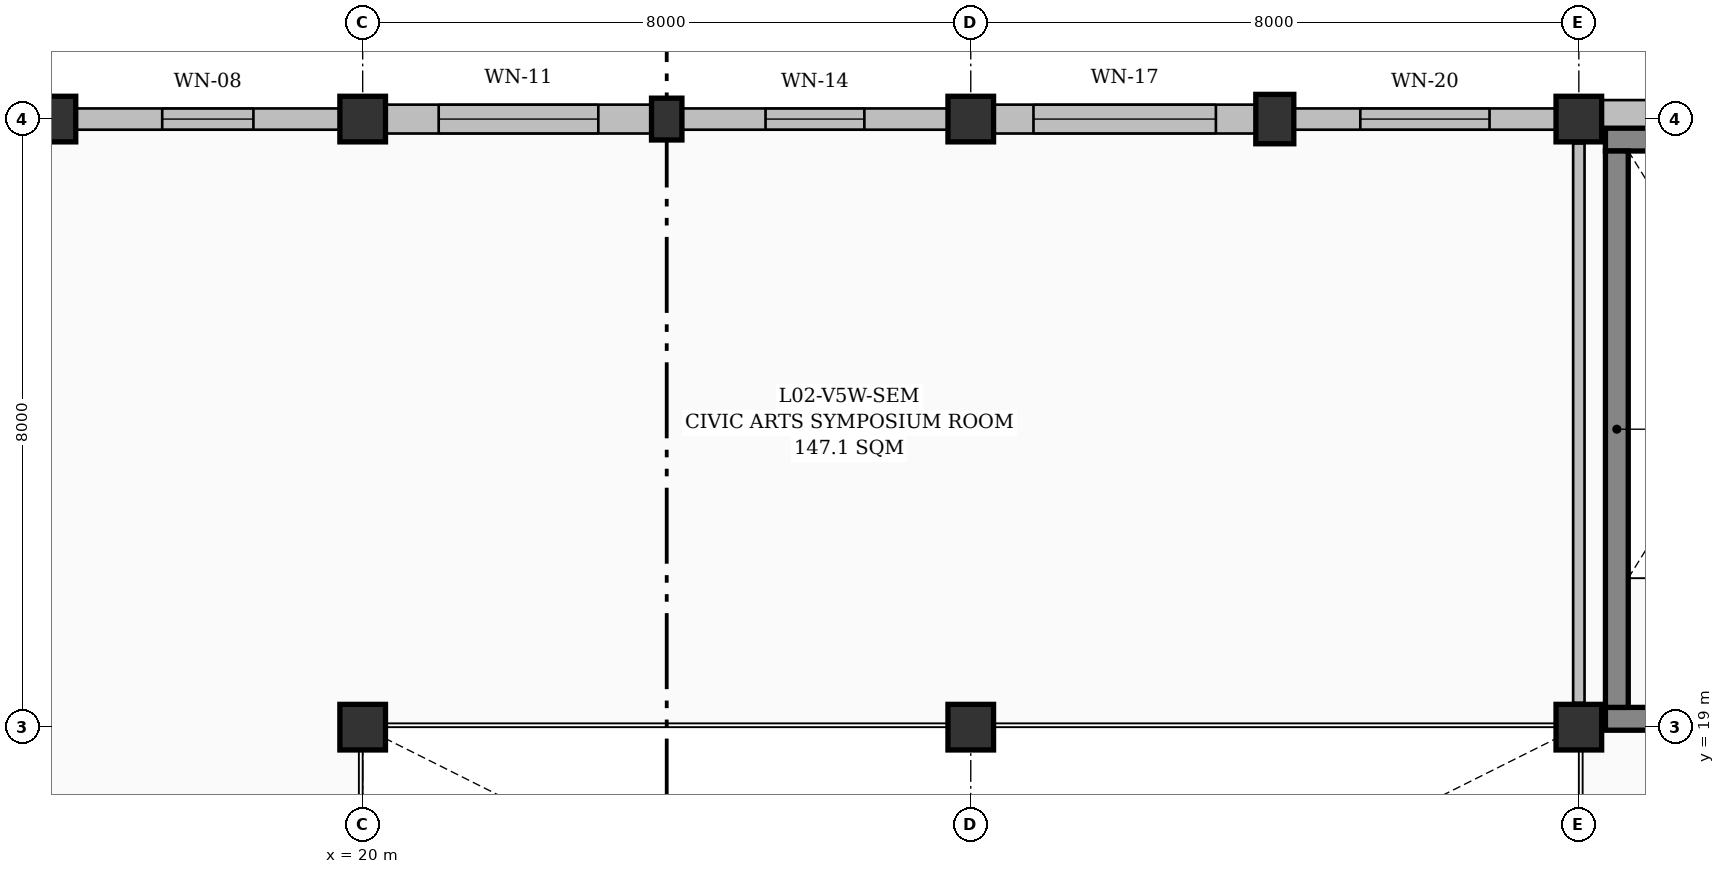
"""IFC4 building model, lengths in metres.
Left out: names, types, materials, properties, quantities, classifications, styles, units other than length and angle.
Written with IfcOpenShell. Run it as: python <this file> out.ifc"""

import sys

from ifc_helpers import new_model, si_unit, direction, frame, frame_2d, origin, origin_2d, place, context, subcontext, project, spatial, rectangle, extrude, element, fill, save


model = new_model("IFC4")
c1 = context("Model", 3, precision=1e-05, world=origin(), true_north=direction((0.0, 1.0)))
c2 = subcontext(c1, "Body", "Model", "MODEL_VIEW")
j1 = project(units=[si_unit("LENGTHUNIT", "METRE"), si_unit("PLANEANGLEUNIT", "RADIAN")], contexts=[c1])
p1 = place(None, origin())
s1 = spatial("IfcSite", under=j1, at=p1, CompositionType="ELEMENT")
p2 = place(p1, origin())
s2 = spatial("IfcBuilding", under=s1, at=p2, CompositionType="ELEMENT")
p3 = place(p2, frame((0.0, 0.0, 9.3)))
s3 = spatial("IfcBuildingStorey", under=s2, at=p3, CompositionType="ELEMENT", Elevation=9.3)
p4 = place(p3, frame((16.0, 27.0, 0.0), z_axis=(0.0, 0.0, 1.0), x_axis=(1.0, 0.0, 0.0)))
e1 = element("IfcColumn", 1, at=p4, inside=s3, PredefinedType="PILASTER", context=c2, shape_type="SweptSolid", body=[
    extrude(rectangle(XDim=0.45, YDim=0.6, at=origin_2d()), origin(), (0.0, 0.0, 1.0), 4.5),
])
for number, where, z_axis, x_axis in (
    (2, (20.0, 19.0, 0.0), (0.0, 0.0, 1.0), (1.0, 0.0, 0.0)),
    (3, (20.0, 27.0, 0.0), (0.0, 0.0, 1.0), (1.0, 0.0, 0.0)),
):
    element("IfcColumn", number, at=place(p3, frame(where, z_axis=z_axis, x_axis=x_axis)), inside=s3, PredefinedType="COLUMN", context=c2, shape_type="SweptSolid", body=[
        extrude(rectangle(XDim=0.6, YDim=0.6, at=origin_2d()), origin(), (0.0, 0.0, 1.0), 4.5),
    ])
p5 = place(p3, frame((24.0, 27.0, 0.0), z_axis=(0.0, 0.0, 1.0), x_axis=(1.0, 0.0, 0.0)))
e4 = element("IfcColumn", 4, at=p5, inside=s3, PredefinedType="PILASTER", context=c2, shape_type="SweptSolid", body=[
    extrude(rectangle(XDim=0.4, YDim=0.55, at=origin_2d()), origin(), (0.0, 0.0, 1.0), 4.5),
])
for number, where, z_axis, x_axis in (
    (5, (28.0, 19.0, 0.0), (0.0, 0.0, 1.0), (1.0, 0.0, 0.0)),
    (6, (28.0, 27.0, 0.0), (0.0, 0.0, 1.0), (1.0, 0.0, 0.0)),
):
    element("IfcColumn", number, at=place(p3, frame(where, z_axis=z_axis, x_axis=x_axis)), inside=s3, PredefinedType="COLUMN", context=c2, shape_type="SweptSolid", body=[
        extrude(rectangle(XDim=0.6, YDim=0.6, at=origin_2d()), origin(), (0.0, 0.0, 1.0), 4.5),
    ])
p6 = place(p3, frame((32.0, 27.0, 0.0), z_axis=(0.0, 0.0, 1.0), x_axis=(1.0, 0.0, 0.0)))
e7 = element("IfcColumn", 7, at=p6, inside=s3, PredefinedType="PILASTER", context=c2, shape_type="SweptSolid", body=[
    extrude(rectangle(XDim=0.5, YDim=0.65, at=origin_2d()), origin(), (0.0, 0.0, 1.0), 4.5),
])
for number, where, z_axis, x_axis in (
    (8, (36.0, 19.0, 0.0), (0.0, 0.0, 1.0), (1.0, 0.0, 0.0)),
    (9, (36.0, 27.0, 0.0), (0.0, 0.0, 1.0), (1.0, 0.0, 0.0)),
):
    element("IfcColumn", number, at=place(p3, frame(where, z_axis=z_axis, x_axis=x_axis)), inside=s3, PredefinedType="COLUMN", context=c2, shape_type="SweptSolid", body=[
        extrude(rectangle(XDim=0.6, YDim=0.6, at=origin_2d()), origin(), (0.0, 0.0, 1.0), 4.5),
    ])
p7 = place(p3, frame((16.225, 27.0, 0.0), z_axis=(0.0, 0.0, 1.0), x_axis=(1.0, 0.0, 0.0)))
e10 = element("IfcWall", 10, at=p7, inside=s3, PredefinedType="SOLIDWALL", context=c2, shape_type="SweptSolid", body=[
    extrude(rectangle(XDim=3.475, YDim=0.28, at=frame_2d((1.737, 0.0))), origin(), (0.0, 0.0, 1.0), 4.125),
])
p8 = place(p7, frame((1.137, 0.0, 0.95)))
e11 = element("IfcOpeningElement", 11, at=p8, cuts=e10, PredefinedType="OPENING", context=c2, shape_type="SweptSolid", body=[
    extrude(rectangle(XDim=1.2, YDim=1.5, at=frame_2d((0.6, 0.75))), frame((0.0, 0.15, 0.0), z_axis=(0.0, -1.0, 0.0), x_axis=(1.0, 0.0, 0.0)), (0.0, 0.0, 1.0), 0.3),
])
p9 = place(p3, frame((20.3, 27.0, 0.0), z_axis=(0.0, 0.0, 1.0), x_axis=(1.0, 0.0, 0.0)))
e12 = element("IfcWall", 12, at=p9, inside=s3, PredefinedType="SOLIDWALL", context=c2, shape_type="SweptSolid", body=[
    extrude(rectangle(XDim=3.5, YDim=0.38, at=frame_2d((1.75, 0.0))), origin(), (0.0, 0.0, 1.0), 4.125),
])
p10 = place(p9, frame((0.7, 0.0, 0.95)))
e13 = element("IfcOpeningElement", 13, at=p10, cuts=e12, PredefinedType="OPENING", context=c2, shape_type="SweptSolid", body=[
    extrude(rectangle(XDim=2.1, YDim=1.5, at=frame_2d((1.05, 0.75))), frame((0.0, 0.2, 0.0), z_axis=(0.0, -1.0, 0.0), x_axis=(1.0, 0.0, 0.0)), (0.0, 0.0, 1.0), 0.4),
])
p11 = place(p3, frame((24.2, 27.0, 0.0), z_axis=(0.0, 0.0, 1.0), x_axis=(1.0, 0.0, 0.0)))
e14 = element("IfcWall", 14, at=p11, inside=s3, PredefinedType="SOLIDWALL", context=c2, shape_type="SweptSolid", body=[
    extrude(rectangle(XDim=3.5, YDim=0.28, at=frame_2d((1.75, 0.0))), origin(), (0.0, 0.0, 1.0), 4.125),
])
p12 = place(p11, frame((1.1, 0.0, 0.95)))
e15 = element("IfcOpeningElement", 15, at=p12, cuts=e14, PredefinedType="OPENING", context=c2, shape_type="SweptSolid", body=[
    extrude(rectangle(XDim=1.3, YDim=1.4, at=frame_2d((0.65, 0.7))), frame((0.0, 0.15, 0.0), z_axis=(0.0, -1.0, 0.0), x_axis=(1.0, 0.0, 0.0)), (0.0, 0.0, 1.0), 0.3),
])
p13 = place(p3, frame((28.3, 27.0, 0.0), z_axis=(0.0, 0.0, 1.0), x_axis=(1.0, 0.0, 0.0)))
e16 = element("IfcWall", 16, at=p13, inside=s3, PredefinedType="SOLIDWALL", context=c2, shape_type="SweptSolid", body=[
    extrude(rectangle(XDim=3.45, YDim=0.38, at=frame_2d((1.725, 0.0))), origin(), (0.0, 0.0, 1.0), 4.125),
])
p14 = place(p13, frame((0.525, 0.0, 0.95)))
e17 = element("IfcOpeningElement", 17, at=p14, cuts=e16, PredefinedType="OPENING", context=c2, shape_type="SweptSolid", body=[
    extrude(rectangle(XDim=2.4, YDim=1.2, at=frame_2d((1.2, 0.6))), frame((0.0, 0.2, 0.0), z_axis=(0.0, -1.0, 0.0), x_axis=(1.0, 0.0, 0.0)), (0.0, 0.0, 1.0), 0.4),
])
p15 = place(p3, frame((32.25, 27.0, 0.0), z_axis=(0.0, 0.0, 1.0), x_axis=(1.0, 0.0, 0.0)))
e18 = element("IfcWall", 18, at=p15, inside=s3, PredefinedType="SOLIDWALL", context=c2, shape_type="SweptSolid", body=[
    extrude(rectangle(XDim=3.45, YDim=0.28, at=frame_2d((1.725, 0.0))), origin(), (0.0, 0.0, 1.0), 4.125),
])
p16 = place(p15, frame((0.875, 0.0, 0.95)))
e19 = element("IfcOpeningElement", 19, at=p16, cuts=e18, PredefinedType="OPENING", context=c2, shape_type="SweptSolid", body=[
    extrude(rectangle(XDim=1.7, YDim=2.0, at=frame_2d((0.85, 1.0))), frame((0.0, 0.15, 0.0), z_axis=(0.0, -1.0, 0.0), x_axis=(1.0, 0.0, 0.0)), (0.0, 0.0, 1.0), 0.3),
])
p17 = place(p3, frame((36.3, 27.06, 0.0), z_axis=(0.0, 0.0, 1.0), x_axis=(1.0, 0.0, 0.0)))
e20 = element("IfcWall", 20, at=p17, inside=s3, PredefinedType="SOLIDWALL", context=c2, shape_type="SweptSolid", body=[
    extrude(rectangle(XDim=3.475, YDim=0.38, at=frame_2d((1.737, 0.0))), origin(), (0.0, 0.0, 1.0), 4.125),
])
p18 = place(p17, frame((0.938, 0.0, 0.95)))
e21 = element("IfcOpeningElement", 21, at=p18, cuts=e20, PredefinedType="OPENING", context=c2, shape_type="SweptSolid", body=[
    extrude(rectangle(XDim=1.6, YDim=1.8, at=frame_2d((0.8, 0.9))), frame((0.0, 0.2, 0.0), z_axis=(0.0, -1.0, 0.0), x_axis=(1.0, 0.0, 0.0)), (0.0, 0.0, 1.0), 0.4),
])
for number, where, z_axis, x_axis in (
    (22, (36.35, 19.11, 0.0), (0.0, 0.0, 1.0), (1.0, 0.0, 0.0)),
    (23, (40.45, 26.73, 0.0), (0.0, 0.0, 1.0), (-1.0, 0.0, 0.0)),
):
    element("IfcWall", number, at=place(p3, frame(where, z_axis=z_axis, x_axis=x_axis)), inside=s3, PredefinedType="SHEAR", context=c2, shape_type="SweptSolid", body=[
        extrude(rectangle(XDim=4.1, YDim=0.3, at=frame_2d((2.05, 0.0))), origin(), (0.0, 0.0, 1.0), 4.25),
    ])
p19 = place(p3, frame((36.5, 19.26, 0.0), z_axis=(0.0, 0.0, 1.0), x_axis=(0.0, 1.0, 0.0)))
e24 = element("IfcWall", 24, at=p19, inside=s3, PredefinedType="SHEAR", context=c2, shape_type="SweptSolid", body=[
    extrude(rectangle(XDim=7.32, YDim=0.3, at=frame_2d((3.66, 0.0))), origin(), (0.0, 0.0, 1.0), 4.25),
])
p20 = place(p3, frame((36.0, 19.32, 0.0), z_axis=(0.0, 0.0, 1.0), x_axis=(0.0, 1.0, 0.0)))
e25 = element("IfcWall", 25, at=p20, inside=s3, PredefinedType="PARTITIONING", context=c2, shape_type="SweptSolid", body=[
    extrude(rectangle(XDim=7.36, YDim=0.15, at=frame_2d((3.68, 0.0))), origin(), (0.0, 0.0, 1.0), 4.25),
])
p21 = place(p8, origin())
e26 = element("IfcWindow", 26, at=p21, inside=s3, PartitioningType="SINGLE_PANEL", PredefinedType="WINDOW", context=c2, shape_type="SweptSolid", body=[
    extrude(rectangle(XDim=1.2, YDim=1.5, at=frame_2d((0.6, 0.75))), frame((0.0, 0.03, 0.0), z_axis=(0.0, -1.0, 0.0), x_axis=(1.0, 0.0, 0.0)), (0.0, 0.0, 1.0), 0.06),
])
fill(e11, e26)
p22 = place(p10, origin())
e27 = element("IfcWindow", 27, at=p22, inside=s3, PartitioningType="TRIPLE_PANEL_VERTICAL", PredefinedType="WINDOW", context=c2, shape_type="SweptSolid", body=[
    extrude(rectangle(XDim=2.1, YDim=1.5, at=frame_2d((1.05, 0.75))), frame((0.0, 0.03, 0.0), z_axis=(0.0, -1.0, 0.0), x_axis=(1.0, 0.0, 0.0)), (0.0, 0.0, 1.0), 0.06),
])
fill(e13, e27)
p23 = place(p12, origin())
e28 = element("IfcWindow", 28, at=p23, inside=s3, PartitioningType="SINGLE_PANEL", PredefinedType="WINDOW", context=c2, shape_type="SweptSolid", body=[
    extrude(rectangle(XDim=1.3, YDim=1.4, at=frame_2d((0.65, 0.7))), frame((0.0, 0.03, 0.0), z_axis=(0.0, -1.0, 0.0), x_axis=(1.0, 0.0, 0.0)), (0.0, 0.0, 1.0), 0.06),
])
fill(e15, e28)
p24 = place(p14, origin())
e29 = element("IfcWindow", 29, at=p24, inside=s3, PartitioningType="TRIPLE_PANEL_HORIZONTAL", PredefinedType="WINDOW", context=c2, shape_type="SweptSolid", body=[
    extrude(rectangle(XDim=2.4, YDim=1.2, at=frame_2d((1.2, 0.6))), frame((0.0, 0.03, 0.0), z_axis=(0.0, -1.0, 0.0), x_axis=(1.0, 0.0, 0.0)), (0.0, 0.0, 1.0), 0.06),
])
fill(e17, e29)
p25 = place(p16, origin())
e30 = element("IfcWindow", 30, at=p25, inside=s3, PartitioningType="DOUBLE_PANEL_VERTICAL", PredefinedType="WINDOW", context=c2, shape_type="SweptSolid", body=[
    extrude(rectangle(XDim=1.7, YDim=2.0, at=frame_2d((0.85, 1.0))), frame((0.0, 0.03, 0.0), z_axis=(0.0, -1.0, 0.0), x_axis=(1.0, 0.0, 0.0)), (0.0, 0.0, 1.0), 0.06),
])
fill(e19, e30)
save(model, sys.argv[1])
